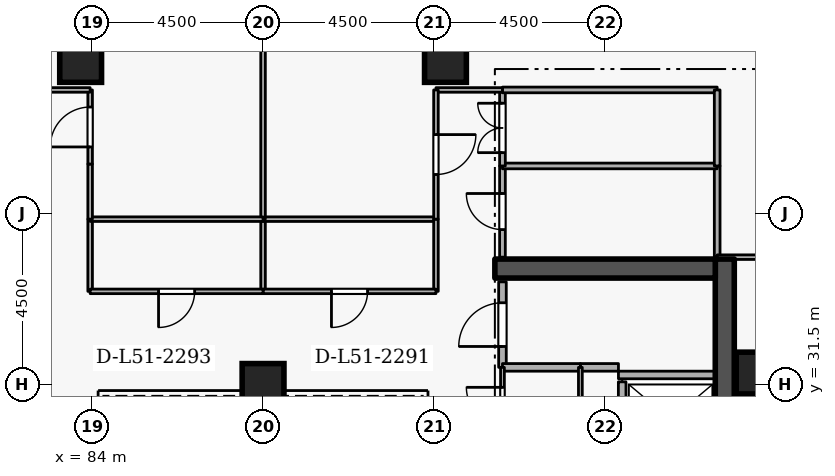
"""IFC4 building model, lengths in metres.
Left out: names, types, materials, properties, quantities, classifications, styles, units other than length and angle.
Written with IfcOpenShell. Run it as: python <this file> out.ifc"""

import sys

from ifc_helpers import new_model, si_unit, direction, frame, frame_2d, origin, origin_2d, place, context, subcontext, project, spatial, rectangle, extrude, element, fill, save


model = new_model("IFC4")
c1 = context("Model", 3, precision=1e-05, world=origin(), true_north=direction((0.0, 1.0)))
c2 = subcontext(c1, "Body", "Model", "MODEL_VIEW")
j1 = project(units=[si_unit("LENGTHUNIT", "METRE"), si_unit("PLANEANGLEUNIT", "RADIAN")], contexts=[c1])
p1 = place(None, origin())
s1 = spatial("IfcSite", under=j1, at=p1, CompositionType="ELEMENT")
p2 = place(p1, origin())
s2 = spatial("IfcBuilding", under=s1, at=p2, CompositionType="ELEMENT")
p3 = place(p2, frame((0.0, 0.0, 192.9)))
s3 = spatial("IfcBuildingStorey", under=s2, at=p3, CompositionType="ELEMENT", Elevation=192.9)
p4 = place(p3, frame((100.65, 19.2, 0.0), z_axis=(0.0, 0.0, 1.0), x_axis=(0.0, 1.0, 0.0)))
e1 = element("IfcWall", 1, at=p4, inside=s3, PredefinedType="SHEAR", context=c2, shape_type="SweptSolid", body=[
    extrude(rectangle(XDim=15.6, YDim=0.5, at=frame_2d((7.8, 0.0))), origin(), (0.0, 0.0, 1.0), 3.6),
])
p5 = place(p3, frame((94.6, 34.55, 0.0), z_axis=(0.0, 0.0, 1.0), x_axis=(1.0, 0.0, 0.0)))
e2 = element("IfcWall", 2, at=p5, inside=s3, PredefinedType="SHEAR", context=c2, shape_type="SweptSolid", body=[
    extrude(rectangle(XDim=5.8, YDim=0.5, at=frame_2d((2.9, 0.0))), origin(), (0.0, 0.0, 1.0), 3.6),
])
for number, where, z_axis, x_axis in (
    (3, (93.3, 40.0, 0.0), (0.0, 0.0, 1.0), (1.0, 0.0, 0.0)),
    (4, (83.7, 40.0, 0.0), (0.0, 0.0, 1.0), (1.0, 0.0, 0.0)),
    (5, (101.5, 31.8, 0.0), (0.0, 0.0, 1.0), (1.0, 0.0, 0.0)),
    (6, (88.5, 31.5, 0.0), (0.0, 0.0, 1.0), (1.0, 0.0, 0.0)),
):
    element("IfcColumn", number, at=place(p3, frame(where, z_axis=z_axis, x_axis=x_axis)), inside=s3, PredefinedType="COLUMN", context=c2, shape_type="SweptSolid", body=[
        extrude(rectangle(XDim=1.1, YDim=1.1, at=origin_2d()), origin(), (0.0, 0.0, 1.0), 3.6),
    ])
p6 = place(p3, frame((97.95, 31.57, 0.0), z_axis=(0.0, 0.0, 1.0), x_axis=(0.0, -1.0, 0.0)))
e7 = element("IfcWall", 7, at=p6, inside=s3, PredefinedType="STANDARD", context=c2, shape_type="SweptSolid", body=[
    extrude(rectangle(XDim=1.99, YDim=0.2, at=frame_2d((0.995, 0.0))), origin(), (0.0, 0.0, 1.0), 3.34),
])
p7 = place(p6, frame((0.485, 0.0, 0.0)))
e8 = element("IfcOpeningElement", 8, at=p7, cuts=e7, PredefinedType="OPENING", context=c2, shape_type="SweptSolid", body=[
    extrude(rectangle(XDim=1.02, YDim=2.06, at=frame_2d((0.51, 1.03))), frame((0.0, 0.11, 0.0), z_axis=(0.0, -1.0, 0.0), x_axis=(1.0, 0.0, 0.0)), (0.0, 0.0, 1.0), 0.22),
])
p8 = place(p3, frame((97.852, 31.75, 0.0), z_axis=(0.0, 0.0, 1.0), x_axis=(1.0, 0.0, 0.0)))
e9 = element("IfcWall", 9, at=p8, inside=s3, PredefinedType="STANDARD", context=c2, shape_type="SweptSolid", body=[
    extrude(rectangle(XDim=2.536, YDim=0.2, at=frame_2d((1.268, 0.0))), origin(), (0.0, 0.0, 1.0), 3.34),
])
p9 = place(p3, frame((94.8, 31.95, 0.0), z_axis=(0.0, 0.0, 1.0), x_axis=(0.0, 1.0, 0.0)))
e10 = element("IfcWall", 10, at=p9, inside=s3, PredefinedType="STANDARD", context=c2, shape_type="SweptSolid", body=[
    extrude(rectangle(XDim=2.25, YDim=0.2, at=frame_2d((1.125, 0.0))), origin(), (0.0, 0.0, 1.0), 3.34),
])
p10 = place(p9, frame((0.55, 0.0, 0.0)))
e11 = element("IfcOpeningElement", 11, at=p10, cuts=e10, PredefinedType="OPENING", context=c2, shape_type="SweptSolid", body=[
    extrude(rectangle(XDim=1.15, YDim=2.1, at=frame_2d((0.575, 1.05))), frame((0.0, 0.11, 0.0), z_axis=(0.0, -1.0, 0.0), x_axis=(1.0, 0.0, 0.0)), (0.0, 0.0, 1.0), 0.22),
])
p11 = place(p3, frame((97.852, 31.95, 0.0), z_axis=(0.0, 0.0, 1.0), x_axis=(-1.0, 0.0, 0.0)))
e12 = element("IfcWall", 12, at=p11, inside=s3, PredefinedType="STANDARD", context=c2, shape_type="SweptSolid", body=[
    extrude(rectangle(XDim=1.002, YDim=0.2, at=frame_2d((0.501, 0.0))), origin(), (0.0, 0.0, 1.0), 3.34),
])
p12 = place(p3, frame((96.85, 31.95, 0.0), z_axis=(0.0, 0.0, 1.0), x_axis=(-1.0, 0.0, 0.0)))
e13 = element("IfcWall", 13, at=p12, inside=s3, PredefinedType="STANDARD", context=c2, shape_type="SweptSolid", body=[
    extrude(rectangle(XDim=2.05, YDim=0.2, at=frame_2d((1.025, 0.0))), origin(), (0.0, 0.0, 1.0), 3.34),
])
p13 = place(p3, frame((94.8, 29.95, 0.0), z_axis=(0.0, 0.0, 1.0), x_axis=(0.0, 1.0, 0.0)))
e14 = element("IfcWall", 14, at=p13, inside=s3, PredefinedType="PARTITIONING", context=c2, shape_type="SweptSolid", body=[
    extrude(rectangle(XDim=2.0, YDim=0.1, at=frame_2d((1.0, 0.0))), origin(), (0.0, 0.0, 1.0), 3.34),
])
p14 = place(p13, frame((0.525, 0.0, 0.0)))
e15 = element("IfcOpeningElement", 15, at=p14, cuts=e14, PredefinedType="OPENING", context=c2, shape_type="SweptSolid", body=[
    extrude(rectangle(XDim=0.95, YDim=2.1, at=frame_2d((0.475, 1.05))), frame((0.0, 0.06, 0.0), z_axis=(0.0, -1.0, 0.0), x_axis=(1.0, 0.0, 0.0)), (0.0, 0.0, 1.0), 0.12),
])
p15 = place(p3, frame((96.85, 31.95, 0.0), z_axis=(0.0, 0.0, 1.0), x_axis=(0.0, -1.0, 0.0)))
e16 = element("IfcWall", 16, at=p15, inside=s3, PredefinedType="PARTITIONING", context=c2, shape_type="SweptSolid", body=[
    extrude(rectangle(XDim=2.0, YDim=0.1, at=frame_2d((1.0, 0.0))), origin(), (0.0, 0.0, 1.0), 3.34),
])
p16 = place(p3, frame((100.45, 37.25, 0.0), z_axis=(0.0, 0.0, 1.0), x_axis=(0.0, -1.0, 0.0)))
e17 = element("IfcWall", 17, at=p16, inside=s3, PredefinedType="PARTITIONING", context=c2, shape_type="SweptSolid", body=[
    extrude(rectangle(XDim=2.4, YDim=0.15, at=frame_2d((1.2, 0.0))), origin(), (0.0, 0.0, 1.0), 3.34),
])
p17 = place(p3, frame((94.8, 34.85, 0.0), z_axis=(0.0, 0.0, 1.0), x_axis=(0.0, 1.0, 0.0)))
e18 = element("IfcWall", 18, at=p17, inside=s3, PredefinedType="PARTITIONING", context=c2, shape_type="SweptSolid", body=[
    extrude(rectangle(XDim=2.4, YDim=0.15, at=frame_2d((1.2, 0.0))), origin(), (0.0, 0.0, 1.0), 3.34),
])
p18 = place(p17, frame((0.725, 0.0, 0.0)))
e19 = element("IfcOpeningElement", 19, at=p18, cuts=e18, PredefinedType="OPENING", context=c2, shape_type="SweptSolid", body=[
    extrude(rectangle(XDim=0.95, YDim=2.1, at=frame_2d((0.475, 1.05))), frame((0.0, 0.085, 0.0), z_axis=(0.0, -1.0, 0.0), x_axis=(1.0, 0.0, 0.0)), (0.0, 0.0, 1.0), 0.17),
])
p19 = place(p3, frame((94.8, 37.25, 0.0), z_axis=(0.0, 0.0, 1.0), x_axis=(1.0, 0.0, 0.0)))
e20 = element("IfcWall", 20, at=p19, inside=s3, PredefinedType="PARTITIONING", context=c2, shape_type="SweptSolid", body=[
    extrude(rectangle(XDim=5.65, YDim=0.15, at=frame_2d((2.825, 0.0))), origin(), (0.0, 0.0, 1.0), 3.34),
])
p20 = place(p3, frame((94.8, 37.25, 0.0), z_axis=(0.0, 0.0, 1.0), x_axis=(0.0, 1.0, 0.0)))
e21 = element("IfcWall", 21, at=p20, inside=s3, PredefinedType="PARTITIONING", context=c2, shape_type="SweptSolid", body=[
    extrude(rectangle(XDim=2.0, YDim=0.15, at=frame_2d((1.0, 0.0))), origin(), (0.0, 0.0, 1.0), 3.34),
])
p21 = place(p20, frame((0.35, 0.0, 0.0)))
e22 = element("IfcOpeningElement", 22, at=p21, cuts=e21, PredefinedType="OPENING", context=c2, shape_type="SweptSolid", body=[
    extrude(rectangle(XDim=1.3, YDim=2.12, at=frame_2d((0.65, 1.06))), frame((0.0, 0.085, 0.0), z_axis=(0.0, -1.0, 0.0), x_axis=(1.0, 0.0, 0.0)), (0.0, 0.0, 1.0), 0.17),
])
p22 = place(p3, frame((94.8, 39.25, 0.0), z_axis=(0.0, 0.0, 1.0), x_axis=(1.0, 0.0, 0.0)))
e23 = element("IfcWall", 23, at=p22, inside=s3, PredefinedType="PARTITIONING", context=c2, shape_type="SweptSolid", body=[
    extrude(rectangle(XDim=5.65, YDim=0.15, at=frame_2d((2.825, 0.0))), origin(), (0.0, 0.0, 1.0), 3.34),
])
p23 = place(p3, frame((100.45, 39.25, 0.0), z_axis=(0.0, 0.0, 1.0), x_axis=(0.0, -1.0, 0.0)))
e24 = element("IfcWall", 24, at=p23, inside=s3, PredefinedType="PARTITIONING", context=c2, shape_type="SweptSolid", body=[
    extrude(rectangle(XDim=2.0, YDim=0.15, at=frame_2d((1.0, 0.0))), origin(), (0.0, 0.0, 1.0), 3.34),
])
p24 = place(p3, frame((88.5, 33.95, 0.0), z_axis=(0.0, 0.0, 1.0), x_axis=(0.0, 1.0, 0.0)))
e25 = element("IfcWall", 25, at=p24, inside=s3, PredefinedType="PARTITIONING", context=c2, shape_type="SweptSolid", body=[
    extrude(rectangle(XDim=1.9, YDim=0.12, at=frame_2d((0.95, 0.0))), origin(), (0.0, 0.0, 1.0), 3.34),
])
p25 = place(p3, frame((88.5, 35.85, 0.0), z_axis=(0.0, 0.0, 1.0), x_axis=(1.0, 0.0, 0.0)))
e26 = element("IfcWall", 26, at=p25, inside=s3, PredefinedType="PARTITIONING", context=c2, shape_type="SweptSolid", body=[
    extrude(rectangle(XDim=4.55, YDim=0.12, at=frame_2d((2.275, 0.0))), origin(), (0.0, 0.0, 1.0), 3.34),
])
p26 = place(p3, frame((93.05, 35.85, 0.0), z_axis=(0.0, 0.0, 1.0), x_axis=(0.0, -1.0, 0.0)))
e27 = element("IfcWall", 27, at=p26, inside=s3, PredefinedType="PARTITIONING", context=c2, shape_type="SweptSolid", body=[
    extrude(rectangle(XDim=1.9, YDim=0.12, at=frame_2d((0.95, 0.0))), origin(), (0.0, 0.0, 1.0), 3.34),
])
p27 = place(p3, frame((93.05, 33.95, 0.0), z_axis=(0.0, 0.0, 1.0), x_axis=(-1.0, 0.0, 0.0)))
e28 = element("IfcWall", 28, at=p27, inside=s3, PredefinedType="PARTITIONING", context=c2, shape_type="SweptSolid", body=[
    extrude(rectangle(XDim=4.55, YDim=0.12, at=frame_2d((2.275, 0.0))), origin(), (0.0, 0.0, 1.0), 3.34),
])
p28 = place(p27, frame((1.8, 0.0, 0.0)))
e29 = element("IfcOpeningElement", 29, at=p28, cuts=e28, PredefinedType="OPENING", context=c2, shape_type="SweptSolid", body=[
    extrude(rectangle(XDim=0.95, YDim=2.1, at=frame_2d((0.475, 1.05))), frame((0.0, 0.07, 0.0), z_axis=(0.0, -1.0, 0.0), x_axis=(1.0, 0.0, 0.0)), (0.0, 0.0, 1.0), 0.14),
])
p29 = place(p3, frame((94.8, 39.25, 0.0), z_axis=(0.0, 0.0, 1.0), x_axis=(-1.0, 0.0, 0.0)))
e30 = element("IfcWall", 30, at=p29, inside=s3, PredefinedType="PARTITIONING", context=c2, shape_type="SweptSolid", body=[
    extrude(rectangle(XDim=1.75, YDim=0.12, at=frame_2d((0.875, 0.0))), origin(), (0.0, 0.0, 1.0), 3.34),
])
p30 = place(p3, frame((93.05, 39.25, 0.0), z_axis=(0.0, 0.0, 1.0), x_axis=(0.0, -1.0, 0.0)))
e31 = element("IfcWall", 31, at=p30, inside=s3, PredefinedType="PARTITIONING", context=c2, shape_type="SweptSolid", body=[
    extrude(rectangle(XDim=3.4, YDim=0.12, at=frame_2d((1.7, 0.0))), origin(), (0.0, 0.0, 1.0), 3.34),
])
p31 = place(p30, frame((1.175, 0.0, 0.0)))
e32 = element("IfcOpeningElement", 32, at=p31, cuts=e31, PredefinedType="OPENING", context=c2, shape_type="SweptSolid", body=[
    extrude(rectangle(XDim=1.05, YDim=2.1, at=frame_2d((0.525, 1.05))), frame((0.0, 0.07, 0.0), z_axis=(0.0, -1.0, 0.0), x_axis=(1.0, 0.0, 0.0)), (0.0, 0.0, 1.0), 0.14),
])
p32 = place(p3, frame((88.5, 35.85, 0.0), z_axis=(0.0, 0.0, 1.0), x_axis=(0.0, 1.0, 0.0)))
e33 = element("IfcWall", 33, at=p32, inside=s3, PredefinedType="PARTITIONING", context=c2, shape_type="SweptSolid", body=[
    extrude(rectangle(XDim=14.87, YDim=0.12, at=frame_2d((7.435, 0.0))), origin(), (0.0, 0.0, 1.0), 2.882),
])
p33 = place(p3, frame((106.22, 34.85, 0.0), z_axis=(0.0, 0.0, 1.0), x_axis=(-1.0, 0.0, 0.0)))
e34 = element("IfcWall", 34, at=p33, inside=s3, PredefinedType="PARTITIONING", context=c2, shape_type="SweptSolid", body=[
    extrude(rectangle(XDim=5.77, YDim=0.12, at=frame_2d((2.885, 0.0))), origin(), (0.0, 0.0, 1.0), 2.545),
])
p34 = place(p3, frame((83.95, 33.95, 0.0), z_axis=(0.0, 0.0, 1.0), x_axis=(0.0, 1.0, 0.0)))
e35 = element("IfcWall", 35, at=p34, inside=s3, PredefinedType="PARTITIONING", context=c2, shape_type="SweptSolid", body=[
    extrude(rectangle(XDim=1.9, YDim=0.12, at=frame_2d((0.95, 0.0))), origin(), (0.0, 0.0, 1.0), 3.34),
])
p35 = place(p3, frame((83.95, 35.85, 0.0), z_axis=(0.0, 0.0, 1.0), x_axis=(1.0, 0.0, 0.0)))
e36 = element("IfcWall", 36, at=p35, inside=s3, PredefinedType="PARTITIONING", context=c2, shape_type="SweptSolid", body=[
    extrude(rectangle(XDim=4.55, YDim=0.12, at=frame_2d((2.275, 0.0))), origin(), (0.0, 0.0, 1.0), 3.34),
])
p36 = place(p3, frame((88.5, 33.95, 0.0), z_axis=(0.0, 0.0, 1.0), x_axis=(-1.0, 0.0, 0.0)))
e37 = element("IfcWall", 37, at=p36, inside=s3, PredefinedType="PARTITIONING", context=c2, shape_type="SweptSolid", body=[
    extrude(rectangle(XDim=4.55, YDim=0.12, at=frame_2d((2.275, 0.0))), origin(), (0.0, 0.0, 1.0), 3.34),
])
p37 = place(p36, frame((1.8, 0.0, 0.0)))
e38 = element("IfcOpeningElement", 38, at=p37, cuts=e37, PredefinedType="OPENING", context=c2, shape_type="SweptSolid", body=[
    extrude(rectangle(XDim=0.95, YDim=2.1, at=frame_2d((0.475, 1.05))), frame((0.0, 0.07, 0.0), z_axis=(0.0, -1.0, 0.0), x_axis=(1.0, 0.0, 0.0)), (0.0, 0.0, 1.0), 0.14),
])
p38 = place(p3, frame((83.95, 35.85, 0.0), z_axis=(0.0, 0.0, 1.0), x_axis=(0.0, 1.0, 0.0)))
e39 = element("IfcWall", 39, at=p38, inside=s3, PredefinedType="PARTITIONING", context=c2, shape_type="SweptSolid", body=[
    extrude(rectangle(XDim=1.45, YDim=0.12, at=frame_2d((0.725, 0.0))), origin(), (0.0, 0.0, 1.0), 3.34),
])
p39 = place(p3, frame((83.95, 37.3, 0.0), z_axis=(0.0, 0.0, 1.0), x_axis=(0.0, 1.0, 0.0)))
e40 = element("IfcWall", 40, at=p39, inside=s3, PredefinedType="PARTITIONING", context=c2, shape_type="SweptSolid", body=[
    extrude(rectangle(XDim=1.95, YDim=0.12, at=frame_2d((0.975, 0.0))), origin(), (0.0, 0.0, 1.0), 3.34),
])
p40 = place(p39, frame((0.45, 0.0, 0.0)))
e41 = element("IfcOpeningElement", 41, at=p40, cuts=e40, PredefinedType="OPENING", context=c2, shape_type="SweptSolid", body=[
    extrude(rectangle(XDim=1.05, YDim=2.1, at=frame_2d((0.525, 1.05))), frame((0.0, 0.07, 0.0), z_axis=(0.0, -1.0, 0.0), x_axis=(1.0, 0.0, 0.0)), (0.0, 0.0, 1.0), 0.14),
])
p41 = place(p3, frame((83.95, 39.25, 0.0), z_axis=(0.0, 0.0, 1.0), x_axis=(-1.0, 0.0, 0.0)))
e42 = element("IfcWall", 42, at=p41, inside=s3, PredefinedType="PARTITIONING", context=c2, shape_type="SweptSolid", body=[
    extrude(rectangle(XDim=1.75, YDim=0.12, at=frame_2d((0.875, 0.0))), origin(), (0.0, 0.0, 1.0), 3.34),
])
p42 = place(p14, origin())
e43 = element("IfcDoor", 43, at=p42, inside=s3, OperationType="SINGLE_SWING_RIGHT", PredefinedType="DOOR", context=c2, shape_type="SweptSolid", body=[
    extrude(rectangle(XDim=0.95, YDim=2.1, at=frame_2d((0.475, 1.05))), frame((0.0, 0.025, 0.0), z_axis=(0.0, -1.0, 0.0), x_axis=(1.0, 0.0, 0.0)), (0.0, 0.0, 1.0), 0.05),
])
fill(e15, e43)
p43 = place(p10, origin())
e44 = element("IfcDoor", 44, at=p43, inside=s3, OperationType="SINGLE_SWING_LEFT", PredefinedType="DOOR", context=c2, shape_type="SweptSolid", body=[
    extrude(rectangle(XDim=1.15, YDim=2.1, at=frame_2d((0.575, 1.05))), frame((0.0, 0.025, 0.0), z_axis=(0.0, -1.0, 0.0), x_axis=(1.0, 0.0, 0.0)), (0.0, 0.0, 1.0), 0.05),
])
fill(e11, e44)
p44 = place(p18, origin())
e45 = element("IfcDoor", 45, at=p44, inside=s3, OperationType="SINGLE_SWING_RIGHT", PredefinedType="DOOR", context=c2, shape_type="SweptSolid", body=[
    extrude(rectangle(XDim=0.95, YDim=2.1, at=frame_2d((0.475, 1.05))), frame((0.0, 0.025, 0.0), z_axis=(0.0, -1.0, 0.0), x_axis=(1.0, 0.0, 0.0)), (0.0, 0.0, 1.0), 0.05),
])
fill(e19, e45)
p45 = place(p21, origin())
e46 = element("IfcDoor", 46, at=p45, inside=s3, OperationType="DOUBLE_DOOR_SINGLE_SWING", PredefinedType="DOOR", context=c2, shape_type="SweptSolid", body=[
    extrude(rectangle(XDim=1.3, YDim=2.12, at=frame_2d((0.65, 1.06))), frame((0.0, 0.025, 0.0), z_axis=(0.0, -1.0, 0.0), x_axis=(1.0, 0.0, 0.0)), (0.0, 0.0, 1.0), 0.05),
])
fill(e22, e46)
p46 = place(p28, origin())
e47 = element("IfcDoor", 47, at=p46, inside=s3, OperationType="SINGLE_SWING_RIGHT", PredefinedType="DOOR", context=c2, shape_type="SweptSolid", body=[
    extrude(rectangle(XDim=0.95, YDim=2.1, at=frame_2d((0.475, 1.05))), frame((0.0, 0.025, 0.0), z_axis=(0.0, -1.0, 0.0), x_axis=(1.0, 0.0, 0.0)), (0.0, 0.0, 1.0), 0.05),
])
fill(e29, e47)
p47 = place(p31, origin())
e48 = element("IfcDoor", 48, at=p47, inside=s3, OperationType="SINGLE_SWING_LEFT", PredefinedType="DOOR", context=c2, shape_type="SweptSolid", body=[
    extrude(rectangle(XDim=1.05, YDim=2.1, at=frame_2d((0.525, 1.05))), frame((0.0, 0.025, 0.0), z_axis=(0.0, -1.0, 0.0), x_axis=(1.0, 0.0, 0.0)), (0.0, 0.0, 1.0), 0.05),
])
fill(e32, e48)
p48 = place(p37, origin())
e49 = element("IfcDoor", 49, at=p48, inside=s3, OperationType="SINGLE_SWING_RIGHT", PredefinedType="DOOR", context=c2, shape_type="SweptSolid", body=[
    extrude(rectangle(XDim=0.95, YDim=2.1, at=frame_2d((0.475, 1.05))), frame((0.0, 0.025, 0.0), z_axis=(0.0, -1.0, 0.0), x_axis=(1.0, 0.0, 0.0)), (0.0, 0.0, 1.0), 0.05),
])
fill(e38, e49)
p49 = place(p40, origin())
e50 = element("IfcDoor", 50, at=p49, inside=s3, OperationType="SINGLE_SWING_LEFT", PredefinedType="DOOR", context=c2, shape_type="SweptSolid", body=[
    extrude(rectangle(XDim=1.05, YDim=2.1, at=frame_2d((0.525, 1.05))), frame((0.0, 0.025, 0.0), z_axis=(0.0, -1.0, 0.0), x_axis=(1.0, 0.0, 0.0)), (0.0, 0.0, 1.0), 0.05),
])
fill(e41, e50)
save(model, sys.argv[1])
